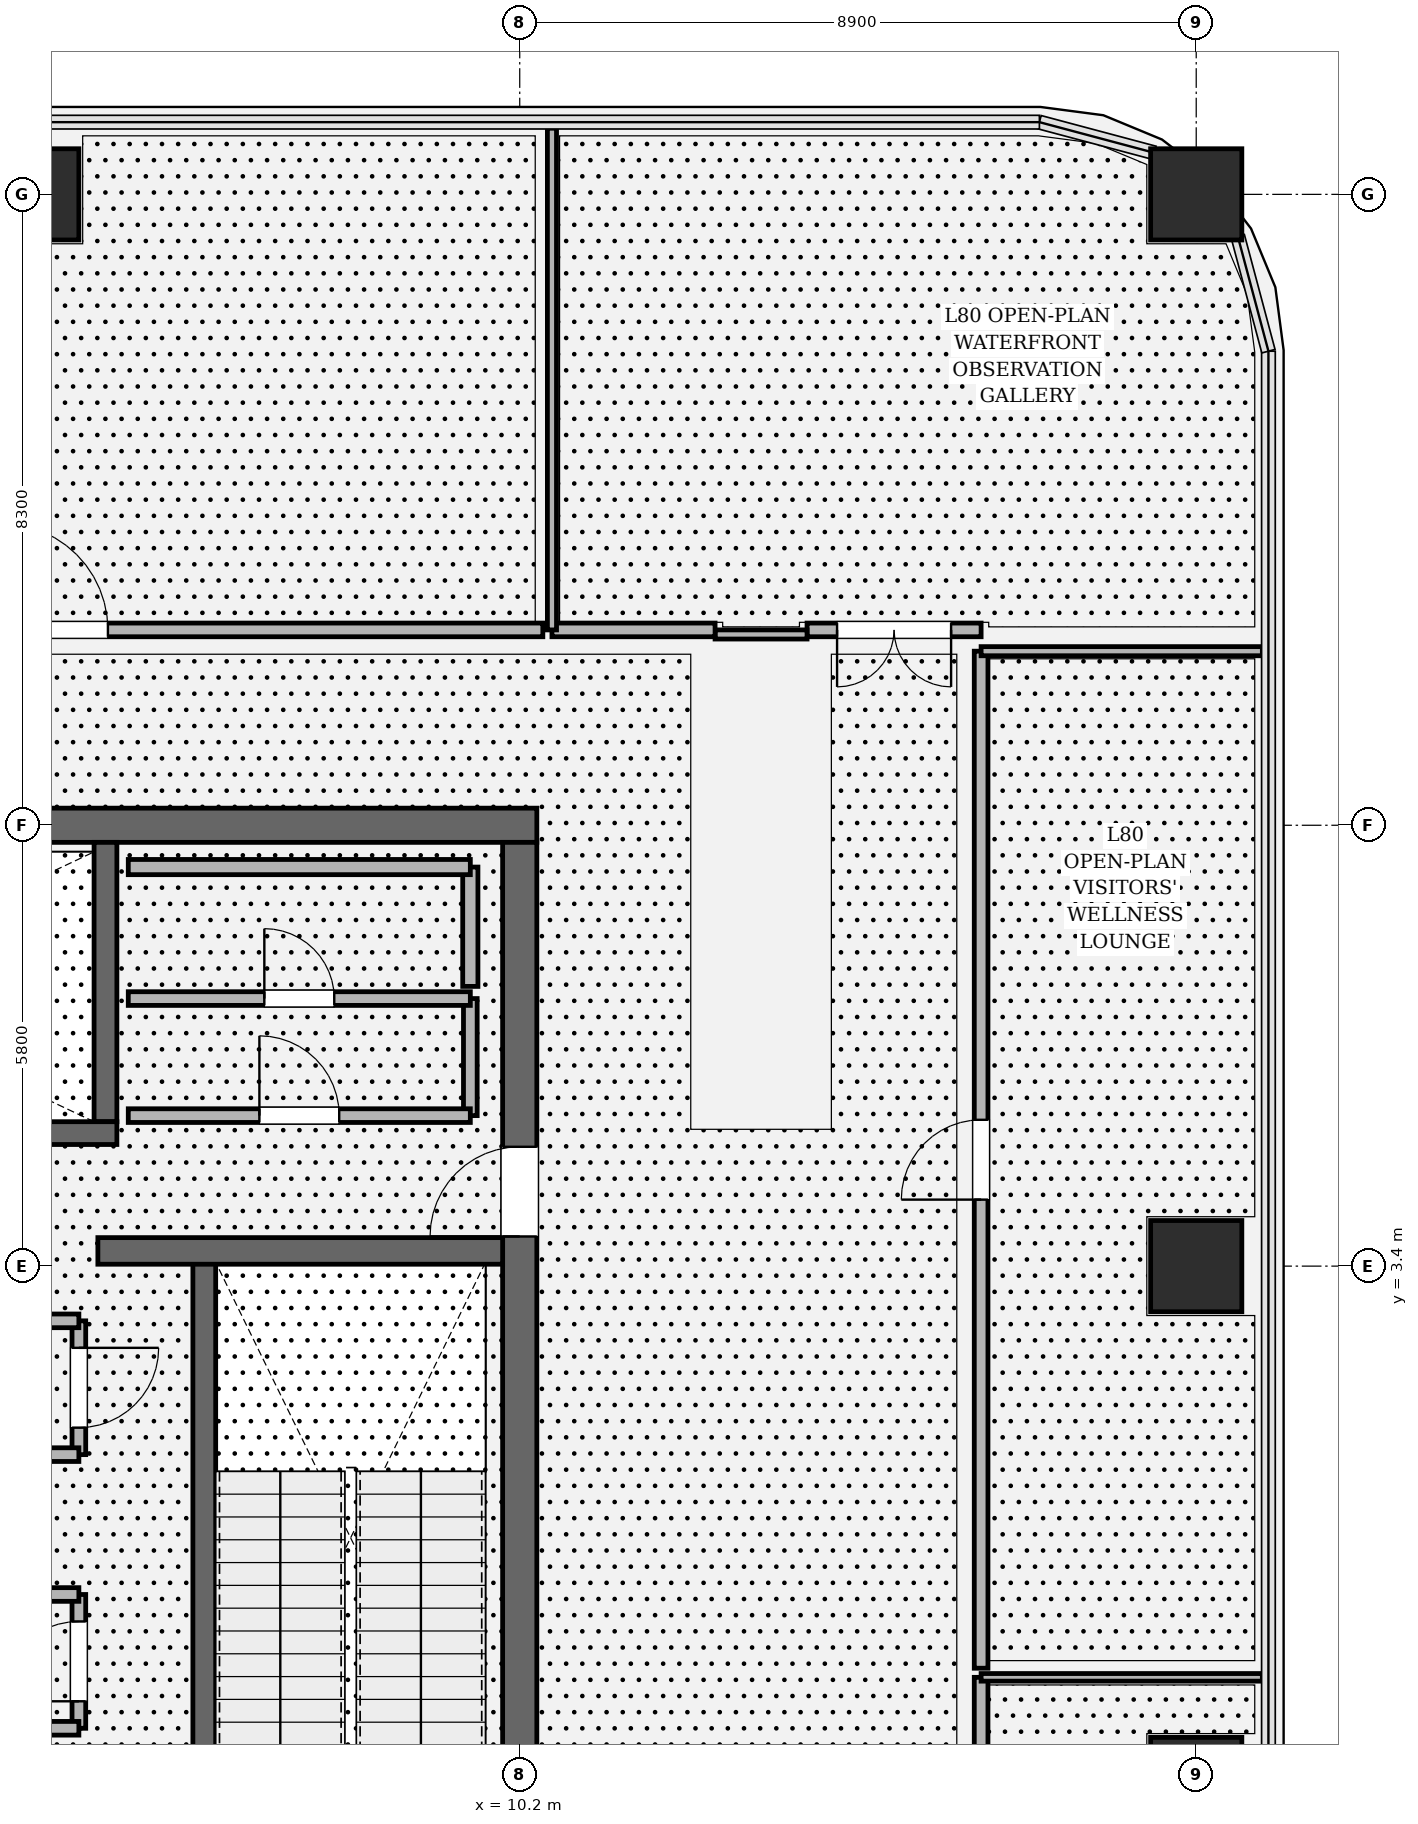
"""IFC4 building model, lengths in metres.
Left out: names, types, materials, properties, quantities, classifications, styles, units other than length and angle.
Written with IfcOpenShell. Run it as: python <this file> out.ifc"""

import sys

from ifc_helpers import new_model, si_unit, direction, frame, frame_2d, origin, origin_2d, place, context, subcontext, project, spatial, rectangle, hollow_rectangle, extrude, element, fill, save


model = new_model("IFC4")
c1 = context("Model", 3, precision=1e-05, world=origin(), true_north=direction((0.0, 1.0)))
c2 = subcontext(c1, "Body", "Model", "MODEL_VIEW")
j1 = project(units=[si_unit("LENGTHUNIT", "METRE"), si_unit("PLANEANGLEUNIT", "RADIAN")], contexts=[c1])
p1 = place(None, origin())
s1 = spatial("IfcSite", under=j1, at=p1, CompositionType="ELEMENT")
p2 = place(p1, origin())
s2 = spatial("IfcBuilding", under=s1, at=p2, CompositionType="ELEMENT")
p3 = place(p2, frame((0.0, 0.0, 339.0)))
s3 = spatial("IfcBuildingStorey", under=s2, at=p3, CompositionType="ELEMENT", Elevation=339.0)
p4 = place(p3, frame((-10.425, 9.2, 0.0), z_axis=(0.0, 0.0, 1.0), x_axis=(1.0, 0.0, 0.0)))
e1 = element("IfcWall", 1, at=p4, inside=s3, PredefinedType="SHEAR", context=c2, shape_type="SweptSolid", body=[
    extrude(rectangle(XDim=20.85, YDim=0.45, at=frame_2d((10.425, 0.0))), origin(), (0.0, 0.0, 1.0), 4.8),
])
p5 = place(p3, frame((10.2, 8.975, 0.0), z_axis=(0.0, 0.0, 1.0), x_axis=(0.0, -1.0, 0.0)))
e2 = element("IfcWall", 2, at=p5, inside=s3, PredefinedType="SHEAR", context=c2, shape_type="SweptSolid", body=[
    extrude(rectangle(XDim=17.95, YDim=0.45, at=frame_2d((8.975, 0.0))), origin(), (0.0, 0.0, 1.0), 4.8),
])
p6 = place(p5, frame((4.005, 0.0, 0.0)))
e3 = element("IfcOpeningElement", 3, at=p6, cuts=e2, PredefinedType="OPENING", context=c2, shape_type="SweptSolid", body=[
    extrude(rectangle(XDim=1.18, YDim=2.2, at=frame_2d((0.59, 1.1))), frame((0.0, 0.235, 0.0), z_axis=(0.0, -1.0, 0.0), x_axis=(1.0, 0.0, 0.0)), (0.0, 0.0, 1.0), 0.47),
])
p7 = place(p3, frame((6.05, 3.45, 0.0), z_axis=(0.0, 0.0, 1.0), x_axis=(0.0, -1.0, 0.0)))
e4 = element("IfcWall", 4, at=p7, inside=s3, PredefinedType="SOLIDWALL", context=c2, shape_type="SweptSolid", body=[
    extrude(rectangle(XDim=8.95, YDim=0.3, at=frame_2d((4.475, 0.0))), origin(), (0.0, 0.0, 1.0), 4.8),
])
p8 = place(p3, frame((4.75, 8.975, 0.0), z_axis=(0.0, 0.0, 1.0), x_axis=(0.0, -1.0, 0.0)))
e5 = element("IfcWall", 5, at=p8, inside=s3, PredefinedType="SOLIDWALL", context=c2, shape_type="SweptSolid", body=[
    extrude(rectangle(XDim=3.675, YDim=0.3, at=frame_2d((1.837, 0.0))), origin(), (0.0, 0.0, 1.0), 4.8),
])
p9 = place(p3, frame((-4.9, 5.15, 0.0), z_axis=(0.0, 0.0, 1.0), x_axis=(1.0, 0.0, 0.0)))
e6 = element("IfcWall", 6, at=p9, inside=s3, PredefinedType="SOLIDWALL", context=c2, shape_type="SweptSolid", body=[
    extrude(rectangle(XDim=9.8, YDim=0.3, at=frame_2d((4.9, 0.0))), origin(), (0.0, 0.0, 1.0), 4.8),
])
p10 = place(p9, frame((0.56, 0.0, 0.0)))
e7 = element("IfcOpeningElement", 7, at=p10, cuts=e6, PredefinedType="OPENING", context=c2, shape_type="SweptSolid", body=[
    extrude(rectangle(XDim=1.18, YDim=2.2, at=frame_2d((0.59, 1.1))), frame((0.0, 0.16, 0.0), z_axis=(0.0, -1.0, 0.0), x_axis=(1.0, 0.0, 0.0)), (0.0, 0.0, 1.0), 0.32),
])
p11 = place(p3, frame((4.65, 3.6, 0.0), z_axis=(0.0, 0.0, 1.0), x_axis=(1.0, 0.0, 0.0)))
e8 = element("IfcWall", 8, at=p11, inside=s3, PredefinedType="SOLIDWALL", context=c2, shape_type="SweptSolid", body=[
    extrude(rectangle(XDim=5.325, YDim=0.35, at=frame_2d((2.663, 0.0))), origin(), (0.0, 0.0, 1.0), 4.8),
])
for number, where, z_axis, x_axis in (
    (9, (19.1, -3.4, 0.0), (0.0, 0.0, 1.0), (1.0, 0.0, 0.0)),
    (10, (19.1, 3.4, 0.0), (0.0, 0.0, 1.0), (1.0, 0.0, 0.0)),
    (11, (19.1, 17.5, 0.0), (0.0, 0.0, 1.0), (1.0, 0.0, 0.0)),
    (12, (3.8, 17.5, 0.0), (0.0, 0.0, 1.0), (1.0, 0.0, 0.0)),
):
    element("IfcColumn", number, at=place(p3, frame(where, z_axis=z_axis, x_axis=x_axis)), inside=s3, PredefinedType="COLUMN", context=c2, shape_type="SweptSolid", body=[
        extrude(hollow_rectangle(XDim=1.2, YDim=1.2, WallThickness=0.035, at=origin_2d()), origin(), (0.0, 0.0, 1.0), 4.8),
    ])
p12 = place(p3, frame((4.4, -2.68, 0.0), z_axis=(0.0, 0.0, 1.0), x_axis=(0.0, 1.0, 0.0)))
e13 = element("IfcWall", 13, at=p12, inside=s3, PredefinedType="PARTITIONING", context=c2, shape_type="SweptSolid", body=[
    extrude(rectangle(XDim=1.76, YDim=0.18, at=frame_2d((0.88, 0.0))), origin(), (0.0, 0.0, 1.0), 4.52),
])
p13 = place(p12, frame((0.355, 0.0, 0.0)))
e14 = element("IfcOpeningElement", 14, at=p13, cuts=e13, PredefinedType="OPENING", context=c2, shape_type="SweptSolid", body=[
    extrude(rectangle(XDim=1.05, YDim=2.2, at=frame_2d((0.525, 1.1))), frame((0.0, 0.1, 0.0), z_axis=(0.0, -1.0, 0.0), x_axis=(1.0, 0.0, 0.0)), (0.0, 0.0, 1.0), 0.2),
])
for number, where, z_axis, x_axis in (
    (15, (4.4, -0.92, 0.0), (0.0, 0.0, 1.0), (-1.0, 0.0, 0.0)),
    (16, (1.6, -2.68, 0.0), (0.0, 0.0, 1.0), (1.0, 0.0, 0.0)),
):
    element("IfcWall", number, at=place(p3, frame(where, z_axis=z_axis, x_axis=x_axis)), inside=s3, PredefinedType="PARTITIONING", context=c2, shape_type="SweptSolid", body=[
        extrude(rectangle(XDim=2.8, YDim=0.18, at=frame_2d((1.4, 0.0))), origin(), (0.0, 0.0, 1.0), 4.52),
    ])
p14 = place(p3, frame((4.4, 0.92, 0.0), z_axis=(0.0, 0.0, 1.0), x_axis=(0.0, 1.0, 0.0)))
e17 = element("IfcWall", 17, at=p14, inside=s3, PredefinedType="PARTITIONING", context=c2, shape_type="SweptSolid", body=[
    extrude(rectangle(XDim=1.76, YDim=0.18, at=frame_2d((0.88, 0.0))), origin(), (0.0, 0.0, 1.0), 4.52),
])
p15 = place(p14, frame((0.355, 0.0, 0.0)))
e18 = element("IfcOpeningElement", 18, at=p15, cuts=e17, PredefinedType="OPENING", context=c2, shape_type="SweptSolid", body=[
    extrude(rectangle(XDim=1.05, YDim=2.2, at=frame_2d((0.525, 1.1))), frame((0.0, 0.1, 0.0), z_axis=(0.0, -1.0, 0.0), x_axis=(1.0, 0.0, 0.0)), (0.0, 0.0, 1.0), 0.2),
])
for number, where, z_axis, x_axis in (
    (19, (4.4, 2.68, 0.0), (0.0, 0.0, 1.0), (-1.0, 0.0, 0.0)),
    (20, (1.6, 0.92, 0.0), (0.0, 0.0, 1.0), (1.0, 0.0, 0.0)),
):
    element("IfcWall", number, at=place(p3, frame(where, z_axis=z_axis, x_axis=x_axis)), inside=s3, PredefinedType="PARTITIONING", context=c2, shape_type="SweptSolid", body=[
        extrude(rectangle(XDim=2.8, YDim=0.18, at=frame_2d((1.4, 0.0))), origin(), (0.0, 0.0, 1.0), 4.52),
    ])
p16 = place(p3, frame((9.55, 5.38, 0.0), z_axis=(0.0, 0.0, 1.0), x_axis=(0.0, 1.0, 0.0)))
e21 = element("IfcWall", 21, at=p16, inside=s3, PredefinedType="PARTITIONING", context=c2, shape_type="SweptSolid", body=[
    extrude(rectangle(XDim=1.54, YDim=0.18, at=frame_2d((0.77, 0.0))), origin(), (0.0, 0.0, 1.0), 4.52),
])
p17 = place(p3, frame((9.55, 6.92, 0.0), z_axis=(0.0, 0.0, 1.0), x_axis=(-1.0, 0.0, 0.0)))
e22 = element("IfcWall", 22, at=p17, inside=s3, PredefinedType="PARTITIONING", context=c2, shape_type="SweptSolid", body=[
    extrude(rectangle(XDim=4.5, YDim=0.18, at=frame_2d((2.25, 0.0))), origin(), (0.0, 0.0, 1.0), 4.52),
])
p18 = place(p17, frame((1.79, 0.0, 0.0)))
e23 = element("IfcOpeningElement", 23, at=p18, cuts=e22, PredefinedType="OPENING", context=c2, shape_type="SweptSolid", body=[
    extrude(rectangle(XDim=0.92, YDim=2.1, at=frame_2d((0.46, 1.05))), frame((0.0, 0.1, 0.0), z_axis=(0.0, -1.0, 0.0), x_axis=(1.0, 0.0, 0.0)), (0.0, 0.0, 1.0), 0.2),
])
p19 = place(p3, frame((5.05, 5.38, 0.0), z_axis=(0.0, 0.0, 1.0), x_axis=(1.0, 0.0, 0.0)))
e24 = element("IfcWall", 24, at=p19, inside=s3, PredefinedType="PARTITIONING", context=c2, shape_type="SweptSolid", body=[
    extrude(rectangle(XDim=4.5, YDim=0.18, at=frame_2d((2.25, 0.0))), origin(), (0.0, 0.0, 1.0), 4.52),
])
p20 = place(p19, frame((1.725, 0.0, 0.0)))
e25 = element("IfcOpeningElement", 25, at=p20, cuts=e24, PredefinedType="OPENING", context=c2, shape_type="SweptSolid", body=[
    extrude(rectangle(XDim=1.05, YDim=2.2, at=frame_2d((0.525, 1.1))), frame((0.0, 0.1, 0.0), z_axis=(0.0, -1.0, 0.0), x_axis=(1.0, 0.0, 0.0)), (0.0, 0.0, 1.0), 0.2),
])
p21 = place(p3, frame((9.55, 7.08, 0.0), z_axis=(0.0, 0.0, 1.0), x_axis=(0.0, 1.0, 0.0)))
e26 = element("IfcWall", 26, at=p21, inside=s3, PredefinedType="SOLIDWALL", context=c2, shape_type="SweptSolid", body=[
    extrude(rectangle(XDim=1.57, YDim=0.2, at=frame_2d((0.785, 0.0))), origin(), (0.0, 0.0, 1.0), 4.52),
])
p22 = place(p3, frame((9.55, 8.65, 0.0), z_axis=(0.0, 0.0, 1.0), x_axis=(-1.0, 0.0, 0.0)))
e27 = element("IfcWall", 27, at=p22, inside=s3, PredefinedType="SOLIDWALL", context=c2, shape_type="SweptSolid", body=[
    extrude(rectangle(XDim=4.5, YDim=0.2, at=frame_2d((2.25, 0.0))), origin(), (0.0, 0.0, 1.0), 4.52),
])
p23 = place(p3, frame((16.27, -13.82, 0.0), z_axis=(0.0, 0.0, 1.0), x_axis=(0.0, 1.0, 0.0)))
e28 = element("IfcWall", 28, at=p23, inside=s3, PredefinedType="PARTITIONING", context=c2, shape_type="SweptSolid", body=[
    extrude(rectangle(XDim=11.81, YDim=0.18, at=frame_2d((5.905, 0.0))), origin(), (0.0, 0.0, 1.0), 3.194),
])
p24 = place(p23, frame((5.395, 0.0, 0.0)))
e29 = element("IfcOpeningElement", 29, at=p24, cuts=e28, PredefinedType="OPENING", context=c2, shape_type="SweptSolid", body=[
    extrude(rectangle(XDim=1.02, YDim=2.2, at=frame_2d((0.51, 1.1))), frame((0.0, 0.1, 0.0), z_axis=(0.0, -1.0, 0.0), x_axis=(1.0, 0.0, 0.0)), (0.0, 0.0, 1.0), 0.2),
])
p25 = place(p3, frame((16.27, -2.01, 0.0), z_axis=(0.0, 0.0, 1.0), x_axis=(1.0, 0.0, 0.0)))
e30 = element("IfcWall", 30, at=p25, inside=s3, PredefinedType="PARTITIONING", context=c2, shape_type="SweptSolid", body=[
    extrude(rectangle(XDim=3.7, YDim=0.1, at=frame_2d((1.85, 0.0))), origin(), (0.0, 0.0, 1.0), 3.194),
])
p26 = place(p3, frame((16.27, -1.89, 0.0), z_axis=(0.0, 0.0, 1.0), x_axis=(0.0, 1.0, 0.0)))
e31 = element("IfcWall", 31, at=p26, inside=s3, PredefinedType="PARTITIONING", context=c2, shape_type="SweptSolid", body=[
    extrude(rectangle(XDim=13.38, YDim=0.18, at=frame_2d((6.69, 0.0))), origin(), (0.0, 0.0, 1.0), 3.194),
])
p27 = place(p26, frame((6.165, 0.0, 0.0)))
e32 = element("IfcOpeningElement", 32, at=p27, cuts=e31, PredefinedType="OPENING", context=c2, shape_type="SweptSolid", body=[
    extrude(rectangle(XDim=1.05, YDim=2.2, at=frame_2d((0.525, 1.1))), frame((0.0, 0.1, 0.0), z_axis=(0.0, -1.0, 0.0), x_axis=(1.0, 0.0, 0.0)), (0.0, 0.0, 1.0), 0.2),
])
p28 = place(p3, frame((16.27, 11.49, 0.0), z_axis=(0.0, 0.0, 1.0), x_axis=(1.0, 0.0, 0.0)))
e33 = element("IfcWall", 33, at=p28, inside=s3, PredefinedType="PARTITIONING", context=c2, shape_type="SweptSolid", body=[
    extrude(rectangle(XDim=3.7, YDim=0.12, at=frame_2d((1.85, 0.0))), origin(), (0.0, 0.0, 1.0), 3.194),
])
p29 = place(p3, frame((16.27, 11.77, 0.0), z_axis=(0.0, 0.0, 1.0), x_axis=(-1.0, 0.0, 0.0)))
e34 = element("IfcWall", 34, at=p29, inside=s3, PredefinedType="PARTITIONING", context=c2, shape_type="SweptSolid", body=[
    extrude(rectangle(XDim=2.29, YDim=0.18, at=frame_2d((1.145, 0.0))), origin(), (0.0, 0.0, 1.0), 4.52),
])
p30 = place(p29, frame((0.395, 0.0, 0.0)))
e35 = element("IfcOpeningElement", 35, at=p30, cuts=e34, PredefinedType="OPENING", context=c2, shape_type="SweptSolid", body=[
    extrude(rectangle(XDim=1.5, YDim=2.3, at=frame_2d((0.75, 1.15))), frame((0.0, 0.1, 0.0), z_axis=(0.0, -1.0, 0.0), x_axis=(1.0, 0.0, 0.0)), (0.0, 0.0, 1.0), 0.2),
])
p31 = place(p3, frame((13.98, 11.71, 0.0), z_axis=(0.0, 0.0, 1.0), x_axis=(-1.0, 0.0, 0.0)))
e36 = element("IfcWall", 36, at=p31, inside=s3, PredefinedType="PARTITIONING", context=c2, shape_type="SweptSolid", body=[
    extrude(rectangle(XDim=1.21, YDim=0.12, at=frame_2d((0.605, 0.0))), origin(), (0.0, 0.0, 1.0), 4.52),
])
p32 = place(p3, frame((12.77, 11.77, 0.0), z_axis=(0.0, 0.0, 1.0), x_axis=(-1.0, 0.0, 0.0)))
e37 = element("IfcWall", 37, at=p32, inside=s3, PredefinedType="PARTITIONING", context=c2, shape_type="SweptSolid", body=[
    extrude(rectangle(XDim=2.146, YDim=0.18, at=frame_2d((1.073, 0.0))), origin(), (0.0, 0.0, 1.0), 4.52),
])
p33 = place(p3, frame((10.624, 11.77, 0.0), z_axis=(0.0, 0.0, 1.0), x_axis=(0.0, 1.0, 0.0)))
e38 = element("IfcWall", 38, at=p33, inside=s3, PredefinedType="PARTITIONING", context=c2, shape_type="SweptSolid", body=[
    extrude(rectangle(XDim=6.6, YDim=0.12, at=frame_2d((3.3, 0.0))), origin(), (0.0, 0.0, 1.0), 3.194),
])
p34 = place(p3, frame((10.504, 11.77, 0.0), z_axis=(0.0, 0.0, 1.0), x_axis=(-1.0, 0.0, 0.0)))
e39 = element("IfcWall", 39, at=p34, inside=s3, PredefinedType="PARTITIONING", context=c2, shape_type="SweptSolid", body=[
    extrude(rectangle(XDim=12.844, YDim=0.18, at=frame_2d((6.422, 0.0))), origin(), (0.0, 0.0, 1.0), 3.194),
])
p35 = place(p34, frame((5.722, 0.0, 0.0)))
e40 = element("IfcOpeningElement", 40, at=p35, cuts=e39, PredefinedType="OPENING", context=c2, shape_type="SweptSolid", body=[
    extrude(rectangle(XDim=1.4, YDim=2.25, at=frame_2d((0.7, 1.125))), frame((0.0, 0.1, 0.0), z_axis=(0.0, -1.0, 0.0), x_axis=(1.0, 0.0, 0.0)), (0.0, 0.0, 1.0), 0.2),
])
p36 = place(p6, origin())
e41 = element("IfcDoor", 41, at=p36, inside=s3, OperationType="SINGLE_SWING_RIGHT", PredefinedType="DOOR", context=c2, shape_type="SweptSolid", body=[
    extrude(rectangle(XDim=1.18, YDim=2.2, at=frame_2d((0.59, 1.1))), frame((0.0, 0.025, 0.0), z_axis=(0.0, -1.0, 0.0), x_axis=(1.0, 0.0, 0.0)), (0.0, 0.0, 1.0), 0.05),
])
fill(e3, e41)
p37 = place(p13, origin())
e42 = element("IfcDoor", 42, at=p37, inside=s3, OperationType="SINGLE_SWING_LEFT", PredefinedType="DOOR", context=c2, shape_type="SweptSolid", body=[
    extrude(rectangle(XDim=1.05, YDim=2.2, at=frame_2d((0.525, 1.1))), frame((0.0, 0.025, 0.0), z_axis=(0.0, -1.0, 0.0), x_axis=(1.0, 0.0, 0.0)), (0.0, 0.0, 1.0), 0.05),
])
fill(e14, e42)
p38 = place(p15, origin())
e43 = element("IfcDoor", 43, at=p38, inside=s3, OperationType="SINGLE_SWING_RIGHT", PredefinedType="DOOR", context=c2, shape_type="SweptSolid", body=[
    extrude(rectangle(XDim=1.05, YDim=2.2, at=frame_2d((0.525, 1.1))), frame((0.0, 0.025, 0.0), z_axis=(0.0, -1.0, 0.0), x_axis=(1.0, 0.0, 0.0)), (0.0, 0.0, 1.0), 0.05),
])
fill(e18, e43)
p39 = place(p20, origin())
e44 = element("IfcDoor", 44, at=p39, inside=s3, OperationType="SINGLE_SWING_LEFT", PredefinedType="DOOR", context=c2, shape_type="SweptSolid", body=[
    extrude(rectangle(XDim=1.05, YDim=2.2, at=frame_2d((0.525, 1.1))), frame((0.0, 0.025, 0.0), z_axis=(0.0, -1.0, 0.0), x_axis=(1.0, 0.0, 0.0)), (0.0, 0.0, 1.0), 0.05),
])
fill(e25, e44)
p40 = place(p18, origin())
e45 = element("IfcDoor", 45, at=p40, inside=s3, OperationType="SINGLE_SWING_RIGHT", PredefinedType="DOOR", context=c2, shape_type="SweptSolid", body=[
    extrude(rectangle(XDim=0.92, YDim=2.1, at=frame_2d((0.46, 1.05))), frame((0.0, 0.025, 0.0), z_axis=(0.0, -1.0, 0.0), x_axis=(1.0, 0.0, 0.0)), (0.0, 0.0, 1.0), 0.05),
])
fill(e23, e45)
p41 = place(p27, origin())
e46 = element("IfcDoor", 46, at=p41, inside=s3, OperationType="SINGLE_SWING_LEFT", PredefinedType="DOOR", context=c2, shape_type="SweptSolid", body=[
    extrude(rectangle(XDim=1.05, YDim=2.2, at=frame_2d((0.525, 1.1))), frame((0.0, 0.025, 0.0), z_axis=(0.0, -1.0, 0.0), x_axis=(1.0, 0.0, 0.0)), (0.0, 0.0, 1.0), 0.05),
])
fill(e32, e46)
p42 = place(p30, origin())
e47 = element("IfcDoor", 47, at=p42, inside=s3, OperationType="DOUBLE_DOOR_SINGLE_SWING", PredefinedType="DOOR", context=c2, shape_type="SweptSolid", body=[
    extrude(rectangle(XDim=1.5, YDim=2.3, at=frame_2d((0.75, 1.15))), frame((0.0, 0.025, 0.0), z_axis=(0.0, -1.0, 0.0), x_axis=(1.0, 0.0, 0.0)), (0.0, 0.0, 1.0), 0.05),
])
fill(e35, e47)
p43 = place(p35, origin())
e48 = element("IfcDoor", 48, at=p43, inside=s3, OperationType="SINGLE_SWING_RIGHT", PredefinedType="DOOR", context=c2, shape_type="SweptSolid", body=[
    extrude(rectangle(XDim=1.4, YDim=2.25, at=frame_2d((0.7, 1.125))), frame((0.0, 0.025, 0.0), z_axis=(0.0, -1.0, 0.0), x_axis=(1.0, 0.0, 0.0)), (0.0, 0.0, 1.0), 0.05),
])
fill(e40, e48)
save(model, sys.argv[1])
